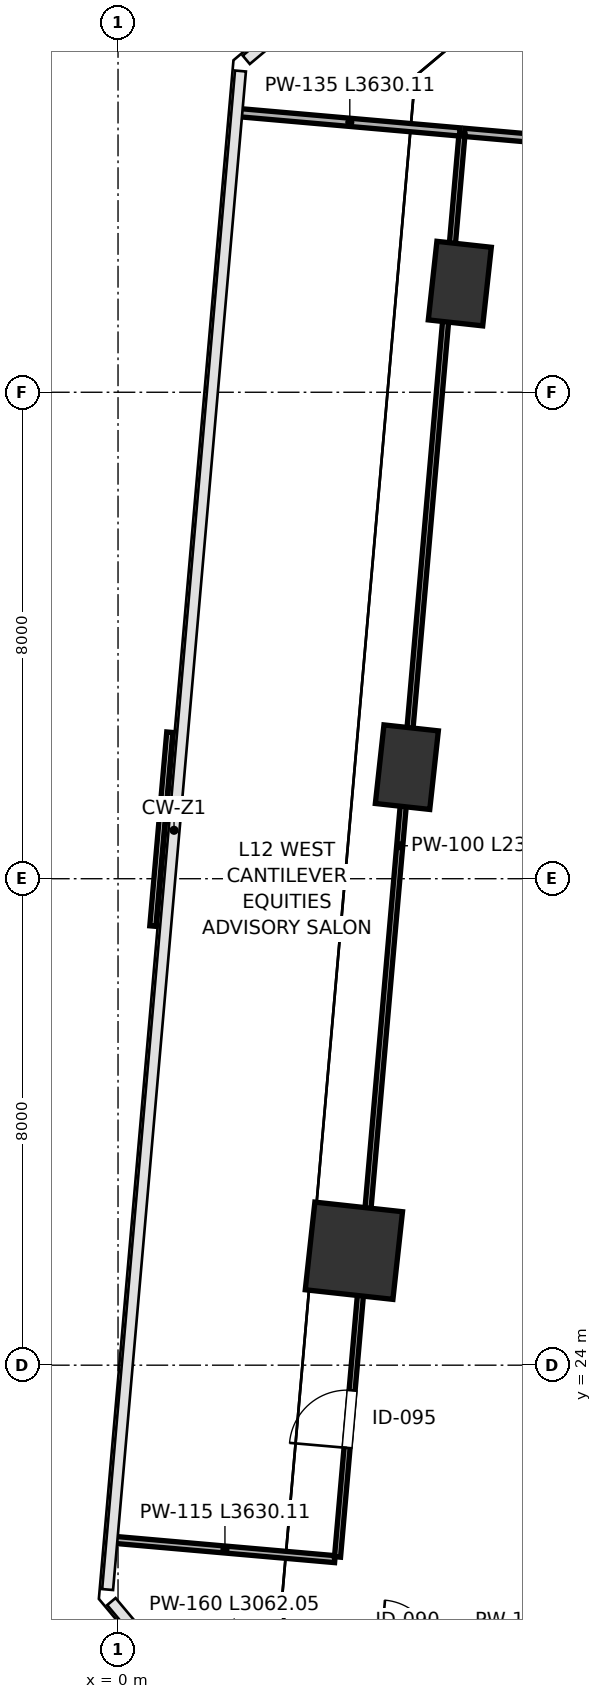
"""IFC4 building model, lengths in metres.
Left out: names, types, materials, properties, quantities, classifications, styles, units other than length and angle.
Written with IfcOpenShell. Run it as: python <this file> out.ifc"""

import sys

from ifc_helpers import new_model, si_unit, direction, frame, frame_2d, origin, origin_2d, place, context, subcontext, project, spatial, rectangle, extrude, clip, halfspace, source, transform, mapped, element, fill, save


model = new_model("IFC4")
c1 = context("Model", 3, precision=1e-05, world=origin(), true_north=direction((0.0, 1.0)))
c2 = subcontext(c1, "Body", "Model", "MODEL_VIEW")
j1 = project(units=[si_unit("LENGTHUNIT", "METRE"), si_unit("PLANEANGLEUNIT", "RADIAN")], contexts=[c1])
p1 = place(None, origin())
s1 = spatial("IfcSite", under=j1, at=p1, CompositionType="ELEMENT")
p2 = place(p1, origin())
s2 = spatial("IfcBuilding", under=s1, at=p2, CompositionType="ELEMENT")
p3 = place(p2, frame((0.0, 0.0, 56.8)))
s3 = spatial("IfcBuildingStorey", under=s2, at=p3, CompositionType="ELEMENT", Elevation=56.8)
p4 = place(p3, frame((3.879, 25.882, 0.0), z_axis=(-0.026809955248, 0.080075102632, 0.996428223325), x_axis=(0.977066647874, 0.212735167395, 0.009193158651)))
e1 = element("IfcColumn", 1, at=p4, inside=s3, PredefinedType="COLUMN", context=c2, shape_type="Clipping", body=[
    clip(clip(extrude(rectangle(XDim=1.45, YDim=1.45, at=origin_2d()), origin(), (0.0, 0.0, 1.0), 4.817), halfspace(frame((0.0, 0.0, 0.069), z_axis=(0.0, 0.0, -1.0), x_axis=(1.0, 0.0, 0.0)), False)), halfspace(frame((0.0, 0.0, 4.749), z_axis=(0.0, 0.0, 1.0), x_axis=(1.0, 0.0, 0.0)), False)),
])
p5 = place(p3, frame((4.75, 33.834, 0.0), z_axis=(0.00912844697, 0.075816823446, 0.997079977102), x_axis=(0.973952851129, -0.226598165554, 0.00831355192)))
e2 = element("IfcColumn", 2, at=p5, inside=s3, PredefinedType="PILASTER", context=c2, shape_type="Clipping", body=[
    clip(clip(extrude(rectangle(XDim=0.9, YDim=1.3, at=origin_2d()), origin(), (0.0, 0.0, 1.0), 4.814), halfspace(frame((0.0, 0.0, 0.054), z_axis=(0.0, 0.0, -1.0), x_axis=(1.0, 0.0, 0.0)), False)), halfspace(frame((0.0, 0.0, 4.76), z_axis=(0.0, 0.0, 1.0), x_axis=(1.0, 0.0, 0.0)), False)),
])
p6 = place(p3, frame((5.621, 41.787, 0.0), z_axis=(0.04510552975, 0.071408642042, 0.996426764508), x_axis=(0.782503935317, -0.622577740199, 0.009195032476)))
e3 = element("IfcColumn", 3, at=p6, inside=s3, PredefinedType="PILASTER", context=c2, shape_type="Clipping", body=[
    clip(clip(extrude(rectangle(XDim=0.9, YDim=1.3, at=origin_2d()), origin(), (0.0, 0.0, 1.0), 4.817), halfspace(frame((0.0, 0.0, 0.06), z_axis=(0.0, 0.0, -1.0), x_axis=(1.0, 0.0, 0.0)), False)), halfspace(frame((0.0, 0.0, 4.758), z_axis=(0.0, 0.0, 1.0), x_axis=(1.0, 0.0, 0.0)), False)),
])
p7 = place(p3, frame((5.7, 44.274, 0.0), z_axis=(0.0, 0.0, 1.0), x_axis=(0.996195324028, -0.087148587968, 0.0)))
e4 = element("IfcWall", 4, at=p7, inside=s3, PredefinedType="PARTITIONING", context=c2, shape_type="SweptSolid", body=[
    extrude(rectangle(XDim=25.07, YDim=0.135, at=frame_2d((12.535, 0.0))), origin(), (0.0, 0.0, 1.0), 4.56),
])
p8 = place(p7, frame((1.05, 0.0, 0.0)))
e5 = element("IfcOpeningElement", 5, at=p8, cuts=e4, PredefinedType="OPENING", context=c2, shape_type="SweptSolid", body=[
    extrude(rectangle(XDim=0.95, YDim=2.15, at=frame_2d((0.475, 1.075))), frame((0.0, 0.078, 0.0), z_axis=(0.0, -1.0, 0.0), x_axis=(1.0, 0.0, 0.0)), (0.0, 0.0, 1.0), 0.155),
])
p9 = place(p3, frame((-0.05, 21.127, 0.0), z_axis=(0.0, 0.0, 1.0), x_axis=(0.996194520424, -0.087157773474, 0.0)))
e6 = element("IfcWall", 6, at=p9, inside=s3, PredefinedType="PARTITIONING", context=c2, shape_type="SweptSolid", body=[
    extrude(rectangle(XDim=3.63, YDim=0.115, at=frame_2d((1.815, 0.0))), origin(), (0.0, 0.0, 1.0), 4.56),
])
p10 = place(p3, frame((3.61, 20.847, 0.0), z_axis=(0.0, 0.0, 1.0), x_axis=(0.087153664928, 0.996194879875, 0.0)))
e7 = element("IfcWall", 7, at=p10, inside=s3, PredefinedType="PARTITIONING", context=c2, shape_type="SweptSolid", body=[
    extrude(rectangle(XDim=23.48, YDim=0.1, at=frame_2d((11.74, 0.0))), origin(), (0.0, 0.0, 1.0), 3.695),
])
p11 = place(p10, frame((1.8, 0.0, 0.0)))
e8 = element("IfcOpeningElement", 8, at=p11, cuts=e7, PredefinedType="OPENING", context=c2, shape_type="SweptSolid", body=[
    extrude(rectangle(XDim=0.95, YDim=2.15, at=frame_2d((0.475, 1.075))), frame((0.0, 0.06, 0.0), z_axis=(0.0, -1.0, 0.0), x_axis=(1.0, 0.0, 0.0)), (0.0, 0.0, 1.0), 0.12),
])
p12 = place(p3, frame((2.004, 44.597, 0.0), z_axis=(0.0, 0.0, 1.0), x_axis=(0.996194520424, -0.087157773474, 0.0)))
e9 = element("IfcWall", 9, at=p12, inside=s3, PredefinedType="PARTITIONING", context=c2, shape_type="SweptSolid", body=[
    extrude(rectangle(XDim=3.63, YDim=0.135, at=frame_2d((1.815, 0.0))), origin(), (0.0, 0.0, 1.0), 4.56),
])
m1 = source(origin(), c2, "Body", "SweptSolid", [
    extrude(rectangle(XDim=0.95, YDim=2.15, at=frame_2d((0.475, 1.075))), frame((0.0, 0.025, 0.0), z_axis=(0.0, -1.0, 0.0), x_axis=(1.0, 0.0, 0.0)), (0.0, 0.0, 1.0), 0.05),
])
p13 = place(p11, origin())
e10 = element("IfcDoor", 10, at=p13, inside=s3, OperationType="SINGLE_SWING_LEFT", PredefinedType="DOOR", context=c2, shape_type="MappedRepresentation", body=[
    mapped(m1, transform((0.0, 0.0, 0.0), scale=1.0)),
])
fill(e8, e10)
save(model, sys.argv[1])
